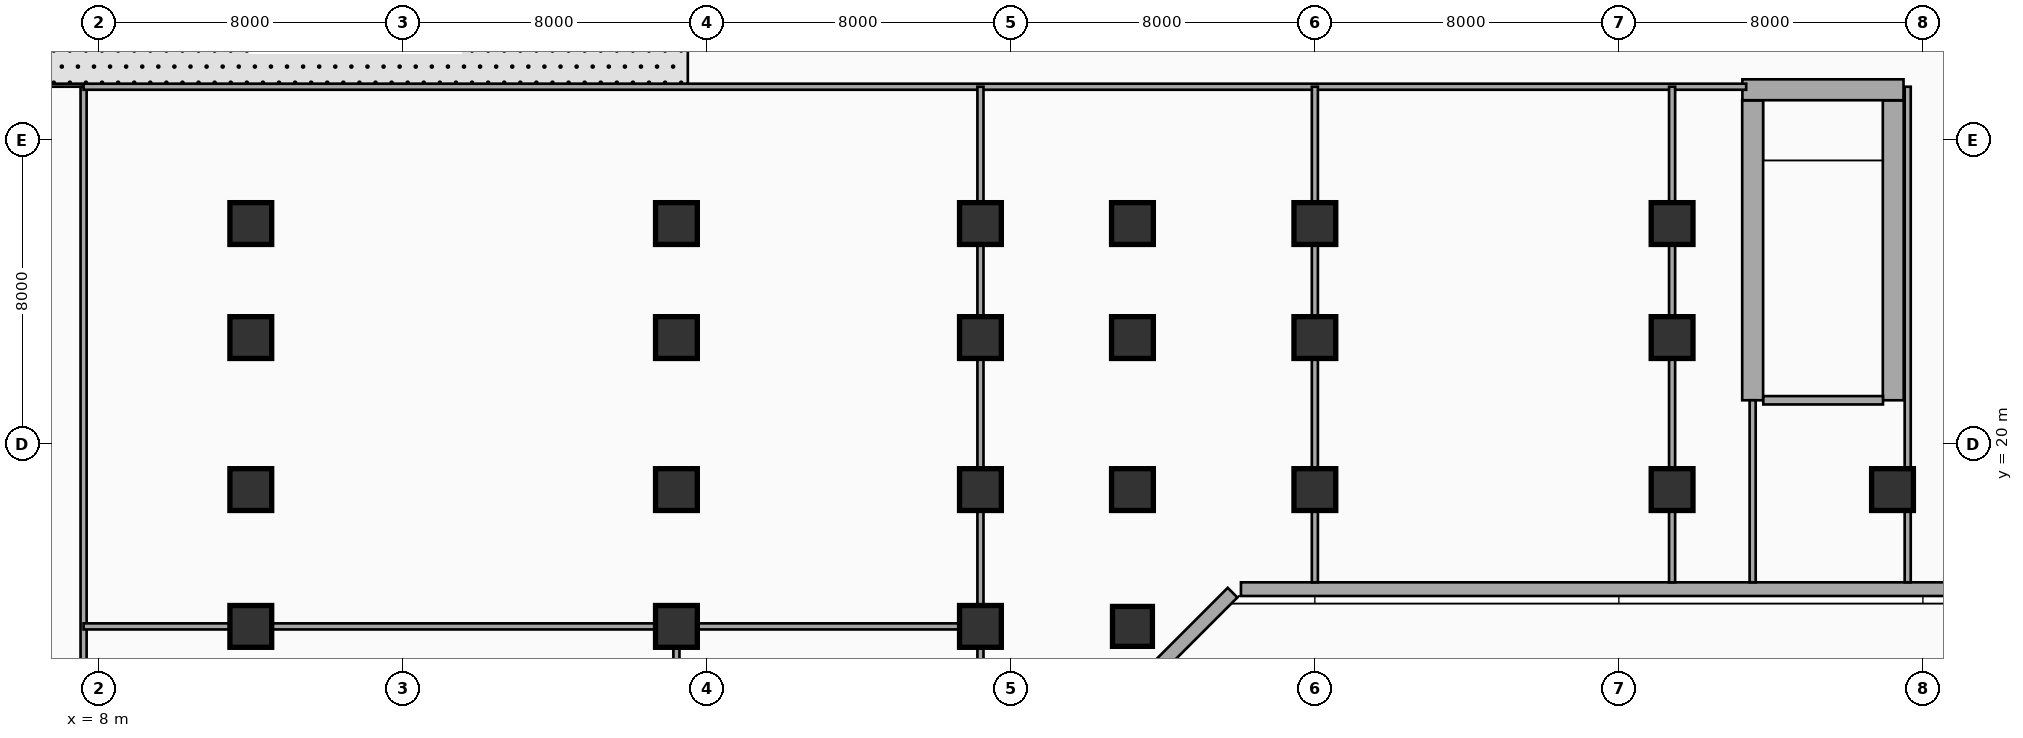
"""IFC4 building model, lengths in metres.
Left out: names, types, materials, properties, quantities, classifications, styles, units other than length and angle.
Written with IfcOpenShell. Run it as: python <this file> out.ifc"""

import sys

from ifc_helpers import new_model, si_unit, direction, frame, frame_2d, origin, origin_2d, place, context, subcontext, project, spatial, rectangle, extrude, element, fill, save


model = new_model("IFC4")
c1 = context("Model", 3, precision=1e-05, world=origin(), true_north=direction((0.0, 1.0)))
c2 = subcontext(c1, "Body", "Model", "MODEL_VIEW")
j1 = project(units=[si_unit("LENGTHUNIT", "METRE"), si_unit("PLANEANGLEUNIT", "RADIAN")], contexts=[c1])
p1 = place(None, origin())
s1 = spatial("IfcSite", under=j1, at=p1, CompositionType="ELEMENT")
p2 = place(p1, origin())
s2 = spatial("IfcBuilding", under=s1, at=p2, CompositionType="ELEMENT")
p3 = place(p2, origin())
s3 = spatial("IfcBuildingStorey", under=s2, at=p3, CompositionType="ELEMENT", Elevation=0.0)
for number, where, z_axis, x_axis in (
    (1, (51.52, 21.15, 0.0), (0.0, 0.0, 1.0), (0.0, 1.0, 0.0)),
    (2, (55.22, 21.15, 0.0), (0.0, 0.0, 1.0), (0.0, 1.0, 0.0)),
):
    element("IfcWall", number, at=place(p3, frame(where, z_axis=z_axis, x_axis=x_axis)), inside=s3, PredefinedType="SHEAR", context=c2, shape_type="SweptSolid", body=[
        extrude(rectangle(XDim=7.89, YDim=0.55, at=frame_2d((3.945, 0.0))), origin(), (0.0, 0.0, 1.0), 5.94),
    ])
p4 = place(p3, frame((51.25, 29.32, 0.0), z_axis=(0.0, 0.0, 1.0), x_axis=(1.0, 0.0, 0.0)))
e3 = element("IfcWall", 3, at=p4, inside=s3, PredefinedType="SHEAR", context=c2, shape_type="SweptSolid", body=[
    extrude(rectangle(XDim=4.24, YDim=0.55, at=frame_2d((2.12, 0.0))), origin(), (0.0, 0.0, 1.0), 5.94),
])
for number, where, z_axis, x_axis in (
    (4, (12.0, 15.2, 0.0), (0.0, 0.0, 1.0), (1.0, 0.0, 0.0)),
    (5, (12.0, 18.8, 0.0), (0.0, 0.0, 1.0), (1.0, 0.0, 0.0)),
    (6, (12.0, 22.8, 0.0), (0.0, 0.0, 1.0), (1.0, 0.0, 0.0)),
    (7, (12.0, 25.8, 0.0), (0.0, 0.0, 1.0), (1.0, 0.0, 0.0)),
    (8, (23.2, 15.2, 0.0), (0.0, 0.0, 1.0), (1.0, 0.0, 0.0)),
    (9, (23.2, 18.8, 0.0), (0.0, 0.0, 1.0), (1.0, 0.0, 0.0)),
    (10, (23.2, 22.8, 0.0), (0.0, 0.0, 1.0), (1.0, 0.0, 0.0)),
    (11, (23.2, 25.8, 0.0), (0.0, 0.0, 1.0), (1.0, 0.0, 0.0)),
    (12, (31.2, 15.2, 0.0), (0.0, 0.0, 1.0), (1.0, 0.0, 0.0)),
    (13, (31.2, 18.8, 0.0), (0.0, 0.0, 1.0), (1.0, 0.0, 0.0)),
    (14, (31.2, 22.8, 0.0), (0.0, 0.0, 1.0), (1.0, 0.0, 0.0)),
    (15, (31.2, 25.8, 0.0), (0.0, 0.0, 1.0), (1.0, 0.0, 0.0)),
):
    element("IfcColumn", number, at=place(p3, frame(where, z_axis=z_axis, x_axis=x_axis)), inside=s3, PredefinedType="COLUMN", context=c2, shape_type="SweptSolid", body=[
        extrude(rectangle(XDim=1.1, YDim=1.1, at=origin_2d()), origin(), (0.0, 0.0, 1.0), 5.94),
    ])
p5 = place(p3, frame((35.2, 15.2, 0.0), z_axis=(0.0, 0.0, 1.0), x_axis=(1.0, 0.0, 0.0)))
e16 = element("IfcColumn", 16, at=p5, inside=s3, PredefinedType="COLUMN", context=c2, shape_type="SweptSolid", body=[
    extrude(rectangle(XDim=1.05, YDim=1.05, at=origin_2d()), origin(), (0.0, 0.0, 1.0), 5.94),
])
for number, where, z_axis, x_axis in (
    (17, (35.2, 18.8, 0.0), (0.0, 0.0, 1.0), (1.0, 0.0, 0.0)),
    (18, (35.2, 22.8, 0.0), (0.0, 0.0, 1.0), (1.0, 0.0, 0.0)),
    (19, (35.2, 25.8, 0.0), (0.0, 0.0, 1.0), (1.0, 0.0, 0.0)),
    (20, (40.0, 18.8, 0.0), (0.0, 0.0, 1.0), (1.0, 0.0, 0.0)),
    (21, (40.0, 22.8, 0.0), (0.0, 0.0, 1.0), (1.0, 0.0, 0.0)),
    (22, (40.0, 25.8, 0.0), (0.0, 0.0, 1.0), (1.0, 0.0, 0.0)),
    (23, (49.4, 18.8, 0.0), (0.0, 0.0, 1.0), (1.0, 0.0, 0.0)),
    (24, (49.4, 22.8, 0.0), (0.0, 0.0, 1.0), (1.0, 0.0, 0.0)),
    (25, (49.4, 25.8, 0.0), (0.0, 0.0, 1.0), (1.0, 0.0, 0.0)),
    (26, (55.2, 18.8, 0.0), (0.0, 0.0, 1.0), (1.0, 0.0, 0.0)),
):
    element("IfcColumn", number, at=place(p3, frame(where, z_axis=z_axis, x_axis=x_axis)), inside=s3, PredefinedType="COLUMN", context=c2, shape_type="SweptSolid", body=[
        extrude(rectangle(XDim=1.1, YDim=1.1, at=origin_2d()), origin(), (0.0, 0.0, 1.0), 5.94),
    ])
p6 = place(p3, frame((35.912, 14.166, 0.0), z_axis=(0.0, 0.0, 1.0), x_axis=(0.707106781187, 0.707106781187, 0.0)))
e27 = element("IfcWall", 27, at=p6, inside=s3, PredefinedType="SOLIDWALL", context=c2, shape_type="SweptSolid", body=[
    extrude(rectangle(XDim=2.718, YDim=0.36, at=frame_2d((1.359, 0.0))), origin(), (0.0, 0.0, 1.0), 5.62),
])
p7 = place(p3, frame((38.055, 16.18, 0.0), z_axis=(0.0, 0.0, 1.0), x_axis=(1.0, 0.0, 0.0)))
e28 = element("IfcWall", 28, at=p7, inside=s3, PredefinedType="SOLIDWALL", context=c2, shape_type="SweptSolid", body=[
    extrude(rectangle(XDim=40.89, YDim=0.36, at=frame_2d((20.445, 0.0))), origin(), (0.0, 0.0, 1.0), 5.62),
])
p8 = place(p7, frame((4.745, 0.0, 0.0), z_axis=(0.0, 0.0, 1.0), x_axis=(-1.0, 0.0, 0.0)))
e29 = element("IfcOpeningElement", 29, at=p8, cuts=e28, PredefinedType="OPENING", context=c2, shape_type="SweptSolid", body=[
    extrude(rectangle(XDim=1.8, YDim=2.2, at=frame_2d((0.9, 1.1))), frame((0.0, 0.19, 0.0), z_axis=(0.0, -1.0, 0.0), x_axis=(1.0, 0.0, 0.0)), (0.0, 0.0, 1.0), 0.38),
])
p9 = place(p7, frame((9.345, 0.0, 0.0), z_axis=(0.0, 0.0, 1.0), x_axis=(-1.0, 0.0, 0.0)))
e30 = element("IfcOpeningElement", 30, at=p9, cuts=e28, PredefinedType="OPENING", context=c2, shape_type="SweptSolid", body=[
    extrude(rectangle(XDim=1.8, YDim=2.2, at=frame_2d((0.9, 1.1))), frame((0.0, 0.19, 0.0), z_axis=(0.0, -1.0, 0.0), x_axis=(1.0, 0.0, 0.0)), (0.0, 0.0, 1.0), 0.38),
])
p10 = place(p7, frame((16.145, 0.0, 0.0), z_axis=(0.0, 0.0, 1.0), x_axis=(-1.0, 0.0, 0.0)))
e31 = element("IfcOpeningElement", 31, at=p10, cuts=e28, PredefinedType="OPENING", context=c2, shape_type="SweptSolid", body=[
    extrude(rectangle(XDim=1.8, YDim=2.2, at=frame_2d((0.9, 1.1))), frame((0.0, 0.19, 0.0), z_axis=(0.0, -1.0, 0.0), x_axis=(1.0, 0.0, 0.0)), (0.0, 0.0, 1.0), 0.38),
])
p11 = place(p7, frame((32.0, 0.0, 0.0), z_axis=(0.0, 0.0, 1.0), x_axis=(-1.0, 0.0, 0.0)))
e32 = element("IfcOpeningElement", 32, at=p11, cuts=e28, PredefinedType="OPENING", context=c2, shape_type="SweptSolid", body=[
    extrude(rectangle(XDim=1.8, YDim=2.4, at=frame_2d((0.9, 1.2))), frame((0.0, 0.19, 0.0), z_axis=(0.0, -1.0, 0.0), x_axis=(1.0, 0.0, 0.0)), (0.0, 0.0, 1.0), 0.38),
])
p12 = place(p3, frame((51.8, 21.15, 0.0), z_axis=(0.0, 0.0, 1.0), x_axis=(1.0, 0.0, 0.0)))
e33 = element("IfcWall", 33, at=p12, inside=s3, PredefinedType="PARTITIONING", context=c2, shape_type="SweptSolid", body=[
    extrude(rectangle(XDim=3.15, YDim=0.22, at=frame_2d((1.575, 0.0))), origin(), (0.0, 0.0, 1.0), 5.62),
])
p13 = place(p12, frame((2.1, 0.0, 0.0), z_axis=(0.0, 0.0, 1.0), x_axis=(-1.0, 0.0, 0.0)))
e34 = element("IfcOpeningElement", 34, at=p13, cuts=e33, PredefinedType="OPENING", context=c2, shape_type="SweptSolid", body=[
    extrude(rectangle(XDim=1.05, YDim=2.15, at=frame_2d((0.525, 1.075))), frame((0.0, 0.12, 0.0), z_axis=(0.0, -1.0, 0.0), x_axis=(1.0, 0.0, 0.0)), (0.0, 0.0, 1.0), 0.24),
])
p14 = place(p3, frame((5.35, 29.48, 0.0), z_axis=(0.0, 0.0, 1.0), x_axis=(1.0, 0.0, 0.0)))
e35 = element("IfcWall", 35, at=p14, inside=s3, PredefinedType="PARTITIONING", context=c2, shape_type="SweptSolid", body=[
    extrude(rectangle(XDim=2.25, YDim=0.16, at=frame_2d((1.125, 0.0))), origin(), (0.0, 0.0, 1.0), 5.275),
])
p15 = place(p14, frame((0.5, 0.0, 0.0)))
e36 = element("IfcOpeningElement", 36, at=p15, cuts=e35, PredefinedType="OPENING", context=c2, shape_type="SweptSolid", body=[
    extrude(rectangle(XDim=1.1, YDim=2.15, at=frame_2d((0.55, 1.075))), frame((0.0, 0.09, 0.0), z_axis=(0.0, -1.0, 0.0), x_axis=(1.0, 0.0, 0.0)), (0.0, 0.0, 1.0), 0.18),
])
p16 = place(p3, frame((7.6, -1.64, 0.0), z_axis=(0.0, 0.0, 1.0), x_axis=(0.0, 1.0, 0.0)))
e37 = element("IfcWall", 37, at=p16, inside=s3, PredefinedType="PARTITIONING", context=c2, shape_type="SweptSolid", body=[
    extrude(rectangle(XDim=31.04, YDim=0.16, at=frame_2d((15.52, 0.0))), origin(), (0.0, 0.0, 1.0), 5.62),
])
p17 = place(p16, frame((1.8, 0.0, 0.0)))
e38 = element("IfcOpeningElement", 38, at=p17, cuts=e37, PredefinedType="OPENING", context=c2, shape_type="SweptSolid", body=[
    extrude(rectangle(XDim=1.1, YDim=2.15, at=frame_2d((0.55, 1.075))), frame((0.0, 0.09, 0.0), z_axis=(0.0, -1.0, 0.0), x_axis=(1.0, 0.0, 0.0)), (0.0, 0.0, 1.0), 0.18),
])
p18 = place(p3, frame((51.52, 16.36, 0.0), z_axis=(0.0, 0.0, 1.0), x_axis=(0.0, 1.0, 0.0)))
e39 = element("IfcWall", 39, at=p18, inside=s3, PredefinedType="PARTITIONING", context=c2, shape_type="SweptSolid", body=[
    extrude(rectangle(XDim=4.79, YDim=0.16, at=frame_2d((2.395, 0.0))), origin(), (0.0, 0.0, 1.0), 5.62),
])
p19 = place(p18, frame((1.5, 0.0, 0.0)))
e40 = element("IfcOpeningElement", 40, at=p19, cuts=e39, PredefinedType="OPENING", context=c2, shape_type="SweptSolid", body=[
    extrude(rectangle(XDim=1.1, YDim=2.15, at=frame_2d((0.55, 1.075))), frame((0.0, 0.09, 0.0), z_axis=(0.0, -1.0, 0.0), x_axis=(1.0, 0.0, 0.0)), (0.0, 0.0, 1.0), 0.18),
])
p20 = place(p3, frame((55.6, 16.36, 0.0), z_axis=(0.0, 0.0, 1.0), x_axis=(0.0, 1.0, 0.0)))
e41 = element("IfcWall", 41, at=p20, inside=s3, PredefinedType="PARTITIONING", context=c2, shape_type="SweptSolid", body=[
    extrude(rectangle(XDim=13.04, YDim=0.16, at=frame_2d((6.52, 0.0))), origin(), (0.0, 0.0, 1.0), 4.805),
])
p21 = place(p3, frame((7.6, 29.4, 0.0), z_axis=(0.0, 0.0, 1.0), x_axis=(1.0, 0.0, 0.0)))
e42 = element("IfcWall", 42, at=p21, inside=s3, PredefinedType="PARTITIONING", context=c2, shape_type="SweptSolid", body=[
    extrude(rectangle(XDim=43.75, YDim=0.16, at=frame_2d((21.875, 0.0))), origin(), (0.0, 0.0, 1.0), 5.275),
])
p22 = place(p21, frame((3.5, 0.0, 0.0)))
e43 = element("IfcOpeningElement", 43, at=p22, cuts=e42, PredefinedType="OPENING", context=c2, shape_type="SweptSolid", body=[
    extrude(rectangle(XDim=1.8, YDim=2.3, at=frame_2d((0.9, 1.15))), frame((0.0, 0.09, 0.0), z_axis=(0.0, -1.0, 0.0), x_axis=(1.0, 0.0, 0.0)), (0.0, 0.0, 1.0), 0.18),
])
p23 = place(p21, frame((18.0, 0.0, 0.0)))
e44 = element("IfcOpeningElement", 44, at=p23, cuts=e42, PredefinedType="OPENING", context=c2, shape_type="SweptSolid", body=[
    extrude(rectangle(XDim=1.8, YDim=2.3, at=frame_2d((0.9, 1.15))), frame((0.0, 0.09, 0.0), z_axis=(0.0, -1.0, 0.0), x_axis=(1.0, 0.0, 0.0)), (0.0, 0.0, 1.0), 0.18),
])
p24 = place(p21, frame((29.5, 0.0, 0.0)))
e45 = element("IfcOpeningElement", 45, at=p24, cuts=e42, PredefinedType="OPENING", context=c2, shape_type="SweptSolid", body=[
    extrude(rectangle(XDim=0.95, YDim=2.15, at=frame_2d((0.475, 1.075))), frame((0.0, 0.09, 0.0), z_axis=(0.0, -1.0, 0.0), x_axis=(1.0, 0.0, 0.0)), (0.0, 0.0, 1.0), 0.18),
])
p25 = place(p21, frame((35.5, 0.0, 0.0)))
e46 = element("IfcOpeningElement", 46, at=p25, cuts=e42, PredefinedType="OPENING", context=c2, shape_type="SweptSolid", body=[
    extrude(rectangle(XDim=1.8, YDim=2.3, at=frame_2d((0.9, 1.15))), frame((0.0, 0.09, 0.0), z_axis=(0.0, -1.0, 0.0), x_axis=(1.0, 0.0, 0.0)), (0.0, 0.0, 1.0), 0.18),
])
p26 = place(p3, frame((7.6, 15.2, 0.0), z_axis=(0.0, 0.0, 1.0), x_axis=(1.0, 0.0, 0.0)))
e47 = element("IfcWall", 47, at=p26, inside=s3, PredefinedType="PARTITIONING", context=c2, shape_type="SweptSolid", body=[
    extrude(rectangle(XDim=23.6, YDim=0.16, at=frame_2d((11.8, 0.0))), origin(), (0.0, 0.0, 1.0), 4.805),
])
p27 = place(p26, frame((6.0, 0.0, 0.0)))
e48 = element("IfcOpeningElement", 48, at=p27, cuts=e47, PredefinedType="OPENING", context=c2, shape_type="SweptSolid", body=[
    extrude(rectangle(XDim=0.95, YDim=2.15, at=frame_2d((0.475, 1.075))), frame((0.0, 0.09, 0.0), z_axis=(0.0, -1.0, 0.0), x_axis=(1.0, 0.0, 0.0)), (0.0, 0.0, 1.0), 0.18),
])
p28 = place(p26, frame((18.5, 0.0, 0.0)))
e49 = element("IfcOpeningElement", 49, at=p28, cuts=e47, PredefinedType="OPENING", context=c2, shape_type="SweptSolid", body=[
    extrude(rectangle(XDim=1.8, YDim=2.3, at=frame_2d((0.9, 1.15))), frame((0.0, 0.09, 0.0), z_axis=(0.0, -1.0, 0.0), x_axis=(1.0, 0.0, 0.0)), (0.0, 0.0, 1.0), 0.18),
])
p29 = place(p3, frame((23.2, -1.64, 0.0), z_axis=(0.0, 0.0, 1.0), x_axis=(0.0, 1.0, 0.0)))
e50 = element("IfcWall", 50, at=p29, inside=s3, PredefinedType="PARTITIONING", context=c2, shape_type="SweptSolid", body=[
    extrude(rectangle(XDim=16.84, YDim=0.16, at=frame_2d((8.42, 0.0))), origin(), (0.0, 0.0, 1.0), 4.955),
])
p30 = place(p3, frame((31.2, -1.64, 0.0), z_axis=(0.0, 0.0, 1.0), x_axis=(0.0, 1.0, 0.0)))
e51 = element("IfcWall", 51, at=p30, inside=s3, PredefinedType="PARTITIONING", context=c2, shape_type="SweptSolid", body=[
    extrude(rectangle(XDim=31.04, YDim=0.16, at=frame_2d((15.52, 0.0))), origin(), (0.0, 0.0, 1.0), 4.805),
])
for number, where, z_axis, x_axis in (
    (52, (40.0, 16.36, 0.0), (0.0, 0.0, 1.0), (0.0, 1.0, 0.0)),
    (53, (49.4, 16.36, 0.0), (0.0, 0.0, 1.0), (0.0, 1.0, 0.0)),
):
    element("IfcWall", number, at=place(p3, frame(where, z_axis=z_axis, x_axis=x_axis)), inside=s3, PredefinedType="PARTITIONING", context=c2, shape_type="SweptSolid", body=[
        extrude(rectangle(XDim=13.04, YDim=0.16, at=frame_2d((6.52, 0.0))), origin(), (0.0, 0.0, 1.0), 4.805),
    ])
p31 = place(p8, origin())
e54 = element("IfcDoor", 54, at=p31, inside=s3, OperationType="DOUBLE_DOOR_SINGLE_SWING", PredefinedType="DOOR", context=c2, shape_type="SweptSolid", body=[
    extrude(rectangle(XDim=1.8, YDim=2.2, at=frame_2d((0.9, 1.1))), frame((0.0, 0.025, 0.0), z_axis=(0.0, -1.0, 0.0), x_axis=(1.0, 0.0, 0.0)), (0.0, 0.0, 1.0), 0.05),
])
fill(e29, e54)
p32 = place(p9, origin())
e55 = element("IfcDoor", 55, at=p32, inside=s3, OperationType="DOUBLE_DOOR_SINGLE_SWING", PredefinedType="DOOR", context=c2, shape_type="SweptSolid", body=[
    extrude(rectangle(XDim=1.8, YDim=2.2, at=frame_2d((0.9, 1.1))), frame((0.0, 0.025, 0.0), z_axis=(0.0, -1.0, 0.0), x_axis=(1.0, 0.0, 0.0)), (0.0, 0.0, 1.0), 0.05),
])
fill(e30, e55)
p33 = place(p10, origin())
e56 = element("IfcDoor", 56, at=p33, inside=s3, OperationType="DOUBLE_DOOR_SINGLE_SWING", PredefinedType="DOOR", context=c2, shape_type="SweptSolid", body=[
    extrude(rectangle(XDim=1.8, YDim=2.2, at=frame_2d((0.9, 1.1))), frame((0.0, 0.025, 0.0), z_axis=(0.0, -1.0, 0.0), x_axis=(1.0, 0.0, 0.0)), (0.0, 0.0, 1.0), 0.05),
])
fill(e31, e56)
p34 = place(p13, origin())
e57 = element("IfcDoor", 57, at=p34, inside=s3, OperationType="SINGLE_SWING_RIGHT", PredefinedType="DOOR", context=c2, shape_type="SweptSolid", body=[
    extrude(rectangle(XDim=1.05, YDim=2.15, at=frame_2d((0.525, 1.075))), frame((0.0, 0.025, 0.0), z_axis=(0.0, -1.0, 0.0), x_axis=(1.0, 0.0, 0.0)), (0.0, 0.0, 1.0), 0.05),
])
fill(e34, e57)
p35 = place(p15, origin())
e58 = element("IfcDoor", 58, at=p35, inside=s3, OperationType="SINGLE_SWING_RIGHT", PredefinedType="DOOR", context=c2, shape_type="SweptSolid", body=[
    extrude(rectangle(XDim=1.1, YDim=2.15, at=frame_2d((0.55, 1.075))), frame((0.0, 0.025, 0.0), z_axis=(0.0, -1.0, 0.0), x_axis=(1.0, 0.0, 0.0)), (0.0, 0.0, 1.0), 0.05),
])
fill(e36, e58)
p36 = place(p19, origin())
e59 = element("IfcDoor", 59, at=p36, inside=s3, OperationType="SINGLE_SWING_LEFT", PredefinedType="DOOR", context=c2, shape_type="SweptSolid", body=[
    extrude(rectangle(XDim=1.1, YDim=2.15, at=frame_2d((0.55, 1.075))), frame((0.0, 0.025, 0.0), z_axis=(0.0, -1.0, 0.0), x_axis=(1.0, 0.0, 0.0)), (0.0, 0.0, 1.0), 0.05),
])
fill(e40, e59)
p37 = place(p22, origin())
e60 = element("IfcDoor", 60, at=p37, inside=s3, OperationType="SINGLE_SWING_LEFT", PredefinedType="DOOR", context=c2, shape_type="SweptSolid", body=[
    extrude(rectangle(XDim=1.8, YDim=2.3, at=frame_2d((0.9, 1.15))), frame((0.0, 0.025, 0.0), z_axis=(0.0, -1.0, 0.0), x_axis=(1.0, 0.0, 0.0)), (0.0, 0.0, 1.0), 0.05),
])
fill(e43, e60)
p38 = place(p23, origin())
e61 = element("IfcDoor", 61, at=p38, inside=s3, OperationType="SINGLE_SWING_RIGHT", PredefinedType="DOOR", context=c2, shape_type="SweptSolid", body=[
    extrude(rectangle(XDim=1.8, YDim=2.3, at=frame_2d((0.9, 1.15))), frame((0.0, 0.025, 0.0), z_axis=(0.0, -1.0, 0.0), x_axis=(1.0, 0.0, 0.0)), (0.0, 0.0, 1.0), 0.05),
])
fill(e44, e61)
p39 = place(p24, origin())
e62 = element("IfcDoor", 62, at=p39, inside=s3, OperationType="SINGLE_SWING_LEFT", PredefinedType="DOOR", context=c2, shape_type="SweptSolid", body=[
    extrude(rectangle(XDim=0.95, YDim=2.15, at=frame_2d((0.475, 1.075))), frame((0.0, 0.025, 0.0), z_axis=(0.0, -1.0, 0.0), x_axis=(1.0, 0.0, 0.0)), (0.0, 0.0, 1.0), 0.05),
])
fill(e45, e62)
p40 = place(p25, origin())
e63 = element("IfcDoor", 63, at=p40, inside=s3, OperationType="SINGLE_SWING_RIGHT", PredefinedType="DOOR", context=c2, shape_type="SweptSolid", body=[
    extrude(rectangle(XDim=1.8, YDim=2.3, at=frame_2d((0.9, 1.15))), frame((0.0, 0.025, 0.0), z_axis=(0.0, -1.0, 0.0), x_axis=(1.0, 0.0, 0.0)), (0.0, 0.0, 1.0), 0.05),
])
fill(e46, e63)
p41 = place(p27, origin())
e64 = element("IfcDoor", 64, at=p41, inside=s3, OperationType="SINGLE_SWING_LEFT", PredefinedType="DOOR", context=c2, shape_type="SweptSolid", body=[
    extrude(rectangle(XDim=0.95, YDim=2.15, at=frame_2d((0.475, 1.075))), frame((0.0, 0.025, 0.0), z_axis=(0.0, -1.0, 0.0), x_axis=(1.0, 0.0, 0.0)), (0.0, 0.0, 1.0), 0.05),
])
fill(e48, e64)
p42 = place(p28, origin())
e65 = element("IfcDoor", 65, at=p42, inside=s3, OperationType="SINGLE_SWING_RIGHT", PredefinedType="DOOR", context=c2, shape_type="SweptSolid", body=[
    extrude(rectangle(XDim=1.8, YDim=2.3, at=frame_2d((0.9, 1.15))), frame((0.0, 0.025, 0.0), z_axis=(0.0, -1.0, 0.0), x_axis=(1.0, 0.0, 0.0)), (0.0, 0.0, 1.0), 0.05),
])
fill(e49, e65)
save(model, sys.argv[1])
